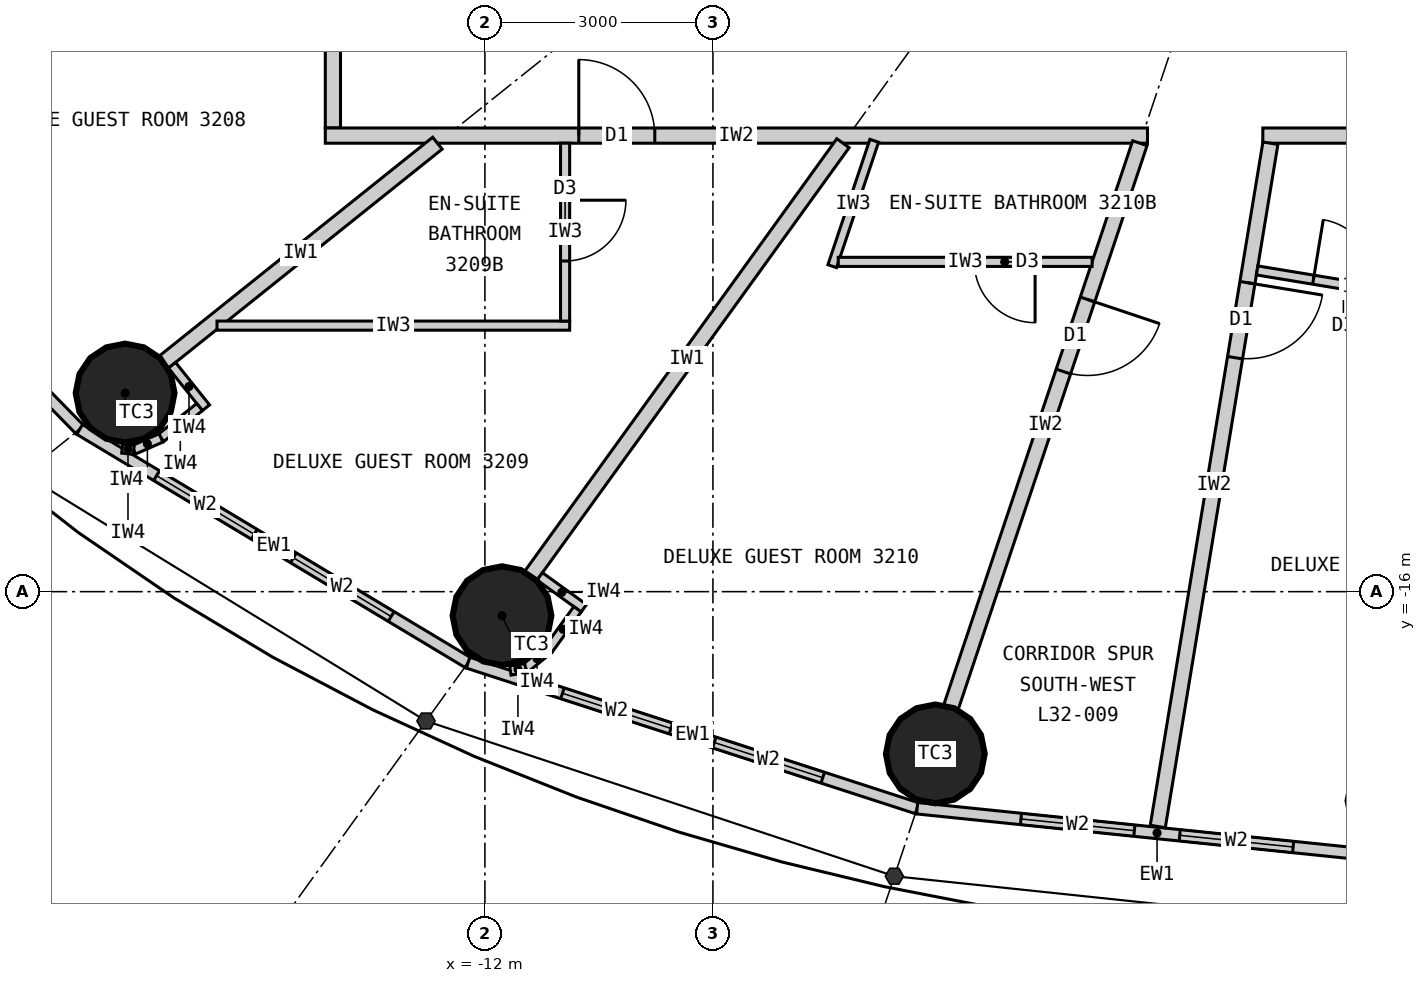
"""IFC4 building model, lengths in metres.
Left out: names, types, materials, properties, quantities, classifications, styles, units other than length and angle.
Written with IfcOpenShell. Run it as: python <this file> out.ifc"""

import sys

from ifc_helpers import new_model, si_unit, direction, frame, frame_2d, origin, origin_2d, place, context, subcontext, project, spatial, rectangle, circle, extrude, element, fill, save


model = new_model("IFC4")
c1 = context("Model", 3, precision=1e-05, world=origin(), true_north=direction((0.0, 1.0)))
c2 = subcontext(c1, "Body", "Model", "MODEL_VIEW")
j1 = project(units=[si_unit("LENGTHUNIT", "METRE"), si_unit("PLANEANGLEUNIT", "RADIAN")], contexts=[c1])
p1 = place(None, origin())
s1 = spatial("IfcSite", under=j1, at=p1, CompositionType="ELEMENT")
p2 = place(p1, origin())
s2 = spatial("IfcBuilding", under=s1, at=p2, CompositionType="ELEMENT")
p3 = place(p2, frame((0.0, 0.0, 125.4)))
s3 = spatial("IfcBuildingStorey", under=s2, at=p3, CompositionType="ELEMENT", Elevation=125.4)
for number, where, z_axis, x_axis in (
    (1, (-16.734, -13.387, 0.0), (0.0, 0.0, 1.0), (1.0, 0.0, 0.0)),
    (2, (-11.775, -16.316, 0.0), (0.0, 0.0, 1.0), (1.0, 0.0, 0.0)),
    (3, (-6.074, -18.135, 0.0), (0.0, 0.0, 1.0), (1.0, 0.0, 0.0)),
):
    element("IfcColumn", number, at=place(p3, frame(where, z_axis=z_axis, x_axis=x_axis)), inside=s3, PredefinedType="COLUMN", context=c2, shape_type="SweptSolid", body=[
        extrude(circle(Radius=0.65, at=origin_2d()), origin(), (0.0, 0.0, 1.0), 3.3),
    ])
p4 = place(p3, frame((-21.287, -9.832, 0.0), z_axis=(0.0, 0.0, 1.0), x_axis=(0.700136650834, -0.714008872605, 0.0)))
e4 = element("IfcWall", 4, at=p4, inside=s3, PredefinedType="ELEMENTEDWALL", context=c2, shape_type="SweptSolid", body=[
    extrude(rectangle(XDim=5.649, YDim=0.15, at=frame_2d((2.825, 0.0))), origin(), (0.0, 0.0, 1.0), 3.12),
])
p5 = place(p4, frame((1.025, 0.0, 0.9)))
e5 = element("IfcOpeningElement", 5, at=p5, cuts=e4, PredefinedType="OPENING", context=c2, shape_type="SweptSolid", body=[
    extrude(rectangle(XDim=1.5, YDim=1.9, at=frame_2d((0.75, 0.95))), frame((0.0, 0.085, 0.0), z_axis=(0.0, -1.0, 0.0), x_axis=(1.0, 0.0, 0.0)), (0.0, 0.0, 1.0), 0.17),
])
p6 = place(p4, frame((3.125, 0.0, 0.9)))
e6 = element("IfcOpeningElement", 6, at=p6, cuts=e4, PredefinedType="OPENING", context=c2, shape_type="SweptSolid", body=[
    extrude(rectangle(XDim=1.5, YDim=1.9, at=frame_2d((0.75, 0.95))), frame((0.0, 0.085, 0.0), z_axis=(0.0, -1.0, 0.0), x_axis=(1.0, 0.0, 0.0)), (0.0, 0.0, 1.0), 0.17),
])
p7 = place(p3, frame((-17.332, -13.866, 0.0), z_axis=(0.0, 0.0, 1.0), x_axis=(0.857308573723, -0.514802884044, 0.0)))
e7 = element("IfcWall", 7, at=p7, inside=s3, PredefinedType="ELEMENTEDWALL", context=c2, shape_type="SweptSolid", body=[
    extrude(rectangle(XDim=5.961, YDim=0.15, at=frame_2d((2.98, 0.0))), origin(), (0.0, 0.0, 1.0), 3.12),
])
p8 = place(p7, frame((1.181, 0.0, 0.9)))
e8 = element("IfcOpeningElement", 8, at=p8, cuts=e7, PredefinedType="OPENING", context=c2, shape_type="SweptSolid", body=[
    extrude(rectangle(XDim=1.5, YDim=1.9, at=frame_2d((0.75, 0.95))), frame((0.0, 0.085, 0.0), z_axis=(0.0, -1.0, 0.0), x_axis=(1.0, 0.0, 0.0)), (0.0, 0.0, 1.0), 0.17),
])
p9 = place(p7, frame((3.281, 0.0, 0.9)))
e9 = element("IfcOpeningElement", 9, at=p9, cuts=e7, PredefinedType="OPENING", context=c2, shape_type="SweptSolid", body=[
    extrude(rectangle(XDim=1.5, YDim=1.9, at=frame_2d((0.75, 0.95))), frame((0.0, 0.085, 0.0), z_axis=(0.0, -1.0, 0.0), x_axis=(1.0, 0.0, 0.0)), (0.0, 0.0, 1.0), 0.17),
])
p10 = place(p3, frame((-12.221, -16.935, 0.0), z_axis=(0.0, 0.0, 1.0), x_axis=(0.951272691506, -0.308350881944, 0.0)))
e10 = element("IfcWall", 10, at=p10, inside=s3, PredefinedType="ELEMENTEDWALL", context=c2, shape_type="SweptSolid", body=[
    extrude(rectangle(XDim=6.211, YDim=0.15, at=frame_2d((3.105, 0.0))), origin(), (0.0, 0.0, 1.0), 3.12),
])
p11 = place(p10, frame((1.305, 0.0, 0.9)))
e11 = element("IfcOpeningElement", 11, at=p11, cuts=e10, PredefinedType="OPENING", context=c2, shape_type="SweptSolid", body=[
    extrude(rectangle(XDim=1.5, YDim=1.9, at=frame_2d((0.75, 0.95))), frame((0.0, 0.085, 0.0), z_axis=(0.0, -1.0, 0.0), x_axis=(1.0, 0.0, 0.0)), (0.0, 0.0, 1.0), 0.17),
])
p12 = place(p10, frame((3.405, 0.0, 0.9)))
e12 = element("IfcOpeningElement", 12, at=p12, cuts=e10, PredefinedType="OPENING", context=c2, shape_type="SweptSolid", body=[
    extrude(rectangle(XDim=1.5, YDim=1.9, at=frame_2d((0.75, 0.95))), frame((0.0, 0.085, 0.0), z_axis=(0.0, -1.0, 0.0), x_axis=(1.0, 0.0, 0.0)), (0.0, 0.0, 1.0), 0.17),
])
p13 = place(p3, frame((-6.313, -18.85, 0.0), z_axis=(0.0, 0.0, 1.0), x_axis=(0.994735690163, -0.102473931887, 0.0)))
e13 = element("IfcWall", 13, at=p13, inside=s3, PredefinedType="ELEMENTEDWALL", context=c2, shape_type="SweptSolid", body=[
    extrude(rectangle(XDim=6.347, YDim=0.15, at=frame_2d((3.173, 0.0))), origin(), (0.0, 0.0, 1.0), 3.12),
])
p14 = place(p13, frame((1.373, 0.0, 0.9)))
e14 = element("IfcOpeningElement", 14, at=p14, cuts=e13, PredefinedType="OPENING", context=c2, shape_type="SweptSolid", body=[
    extrude(rectangle(XDim=1.5, YDim=1.9, at=frame_2d((0.75, 0.95))), frame((0.0, 0.085, 0.0), z_axis=(0.0, -1.0, 0.0), x_axis=(1.0, 0.0, 0.0)), (0.0, 0.0, 1.0), 0.17),
])
p15 = place(p13, frame((3.473, 0.0, 0.9)))
e15 = element("IfcOpeningElement", 15, at=p15, cuts=e13, PredefinedType="OPENING", context=c2, shape_type="SweptSolid", body=[
    extrude(rectangle(XDim=1.5, YDim=1.9, at=frame_2d((0.75, 0.95))), frame((0.0, 0.085, 0.0), z_axis=(0.0, -1.0, 0.0), x_axis=(1.0, 0.0, 0.0)), (0.0, 0.0, 1.0), 0.17),
])
p16 = place(p3, frame((-14.0, 9.9, 0.0), z_axis=(0.0, 0.0, 1.0), x_axis=(0.0, -1.0, 0.0)))
e16 = element("IfcWall", 16, at=p16, inside=s3, PredefinedType="PARTITIONING", context=c2, shape_type="SweptSolid", body=[
    extrude(rectangle(XDim=19.8, YDim=0.2, at=frame_2d((9.9, 0.0))), origin(), (0.0, 0.0, 1.0), 3.12),
])
p17 = place(p16, frame((1.678, 0.0, 0.0)))
e17 = element("IfcOpeningElement", 17, at=p17, cuts=e16, PredefinedType="OPENING", context=c2, shape_type="SweptSolid", body=[
    extrude(rectangle(XDim=1.0, YDim=2.2, at=frame_2d((0.5, 1.1))), frame((0.0, 0.11, 0.0), z_axis=(0.0, -1.0, 0.0), x_axis=(1.0, 0.0, 0.0)), (0.0, 0.0, 1.0), 0.22),
])
p18 = place(p16, frame((7.598, 0.0, 0.0)))
e18 = element("IfcOpeningElement", 18, at=p18, cuts=e16, PredefinedType="OPENING", context=c2, shape_type="SweptSolid", body=[
    extrude(rectangle(XDim=1.0, YDim=2.2, at=frame_2d((0.5, 1.1))), frame((0.0, 0.11, 0.0), z_axis=(0.0, -1.0, 0.0), x_axis=(1.0, 0.0, 0.0)), (0.0, 0.0, 1.0), 0.22),
])
p19 = place(p16, frame((12.26, 0.0, 0.0)))
e19 = element("IfcOpeningElement", 19, at=p19, cuts=e16, PredefinedType="OPENING", context=c2, shape_type="SweptSolid", body=[
    extrude(rectangle(XDim=1.0, YDim=2.2, at=frame_2d((0.5, 1.1))), frame((0.0, 0.11, 0.0), z_axis=(0.0, -1.0, 0.0), x_axis=(1.0, 0.0, 0.0)), (0.0, 0.0, 1.0), 0.22),
])
p20 = place(p16, frame((16.922, 0.0, 0.0)))
e20 = element("IfcOpeningElement", 20, at=p20, cuts=e16, PredefinedType="OPENING", context=c2, shape_type="SweptSolid", body=[
    extrude(rectangle(XDim=1.0, YDim=2.2, at=frame_2d((0.5, 1.1))), frame((0.0, 0.11, 0.0), z_axis=(0.0, -1.0, 0.0), x_axis=(1.0, 0.0, 0.0)), (0.0, 0.0, 1.0), 0.22),
])
p21 = place(p3, frame((1.765, -10.0, 0.0), z_axis=(0.0, 0.0, 1.0), x_axis=(-1.0, 0.0, 0.0)))
e21 = element("IfcWall", 21, at=p21, inside=s3, PredefinedType="PARTITIONING", context=c2, shape_type="SweptSolid", body=[
    extrude(rectangle(XDim=3.53, YDim=0.2, at=frame_2d((1.765, 0.0))), origin(), (0.0, 0.0, 1.0), 3.12),
])
p22 = place(p3, frame((-3.283, -10.0, 0.0), z_axis=(0.0, 0.0, 1.0), x_axis=(-1.0, 0.0, 0.0)))
e22 = element("IfcWall", 22, at=p22, inside=s3, PredefinedType="PARTITIONING", context=c2, shape_type="SweptSolid", body=[
    extrude(rectangle(XDim=10.817, YDim=0.2, at=frame_2d((5.409, 0.0))), origin(), (0.0, 0.0, 1.0), 3.12),
])
p23 = place(p22, frame((6.482, 0.0, 0.0)))
e23 = element("IfcOpeningElement", 23, at=p23, cuts=e22, PredefinedType="OPENING", context=c2, shape_type="SweptSolid", body=[
    extrude(rectangle(XDim=1.0, YDim=2.2, at=frame_2d((0.5, 1.1))), frame((0.0, 0.11, 0.0), z_axis=(0.0, -1.0, 0.0), x_axis=(1.0, 0.0, 0.0)), (0.0, 0.0, 1.0), 0.22),
])
p24 = place(p3, frame((-12.625, -10.1, 0.0), z_axis=(0.0, 0.0, 1.0), x_axis=(-0.780863644897, -0.624701503182, 0.0)))
e24 = element("IfcWall", 24, at=p24, inside=s3, PredefinedType="PARTITIONING", context=c2, shape_type="SweptSolid", body=[
    extrude(rectangle(XDim=4.612, YDim=0.2, at=frame_2d((2.306, 0.0))), origin(), (0.0, 0.0, 1.0), 2.37),
])
p25 = place(p3, frame((-7.289, -10.1, 0.0), z_axis=(0.0, 0.0, 1.0), x_axis=(-0.585217367024, -0.81087645997, 0.0)))
e25 = element("IfcWall", 25, at=p25, inside=s3, PredefinedType="PARTITIONING", context=c2, shape_type="SweptSolid", body=[
    extrude(rectangle(XDim=7.016, YDim=0.2, at=frame_2d((3.508, 0.0))), origin(), (0.0, 0.0, 1.0), 2.37),
])
p26 = place(p3, frame((-3.383, -10.1, 0.0), z_axis=(0.0, 0.0, 1.0), x_axis=(-0.317603705574, -0.948223542318, 0.0)))
e26 = element("IfcWall", 26, at=p26, inside=s3, PredefinedType="PARTITIONING", context=c2, shape_type="SweptSolid", body=[
    extrude(rectangle(XDim=7.823, YDim=0.2, at=frame_2d((3.912, 0.0))), origin(), (0.0, 0.0, 1.0), 2.37),
])
p27 = place(p26, frame((2.168, 0.0, 0.0)))
e27 = element("IfcOpeningElement", 27, at=p27, cuts=e26, PredefinedType="OPENING", context=c2, shape_type="SweptSolid", body=[
    extrude(rectangle(XDim=1.0, YDim=2.2, at=frame_2d((0.5, 1.1))), frame((0.0, 0.11, 0.0), z_axis=(0.0, -1.0, 0.0), x_axis=(1.0, 0.0, 0.0)), (0.0, 0.0, 1.0), 0.22),
])
p28 = place(p3, frame((-1.665, -10.1, 0.0), z_axis=(0.0, 0.0, 1.0), x_axis=(-0.162660519103, -0.986682094459, 0.0)))
e28 = element("IfcWall", 28, at=p28, inside=s3, PredefinedType="PARTITIONING", context=c2, shape_type="SweptSolid", body=[
    extrude(rectangle(XDim=9.111, YDim=0.2, at=frame_2d((4.555, 0.0))), origin(), (0.0, 0.0, 1.0), 3.12),
])
p29 = place(p28, frame((1.86, 0.0, 0.0)))
e29 = element("IfcOpeningElement", 29, at=p29, cuts=e28, PredefinedType="OPENING", context=c2, shape_type="SweptSolid", body=[
    extrude(rectangle(XDim=1.0, YDim=2.2, at=frame_2d((0.5, 1.1))), frame((0.0, 0.11, 0.0), z_axis=(0.0, -1.0, 0.0), x_axis=(1.0, 0.0, 0.0)), (0.0, 0.0, 1.0), 0.22),
])
p30 = place(p3, frame((-15.525, -12.5, 0.0), z_axis=(0.0, 0.0, 1.0), x_axis=(1.0, 0.0, 0.0)))
e30 = element("IfcWall", 30, at=p30, inside=s3, PredefinedType="PARTITIONING", context=c2, shape_type="SweptSolid", body=[
    extrude(rectangle(XDim=4.64, YDim=0.12, at=frame_2d((2.32, 0.0))), origin(), (0.0, 0.0, 1.0), 3.12),
])
p31 = place(p3, frame((-10.945, -10.1, 0.0), z_axis=(0.0, 0.0, 1.0), x_axis=(0.0, -1.0, 0.0)))
e31 = element("IfcWall", 31, at=p31, inside=s3, PredefinedType="PARTITIONING", context=c2, shape_type="SweptSolid", body=[
    extrude(rectangle(XDim=2.34, YDim=0.12, at=frame_2d((1.17, 0.0))), origin(), (0.0, 0.0, 1.0), 3.12),
])
p32 = place(p31, frame((0.75, 0.0, 0.0)))
e32 = element("IfcOpeningElement", 32, at=p32, cuts=e31, PredefinedType="OPENING", context=c2, shape_type="SweptSolid", body=[
    extrude(rectangle(XDim=0.8, YDim=2.1, at=frame_2d((0.4, 1.05))), frame((0.0, 0.07, 0.0), z_axis=(0.0, -1.0, 0.0), x_axis=(1.0, 0.0, 0.0)), (0.0, 0.0, 1.0), 0.14),
])
p33 = place(p3, frame((-6.878, -10.068, 0.0), z_axis=(0.0, 0.0, 1.0), x_axis=(-0.317532394508, -0.948247424694, 0.0)))
e33 = element("IfcWall", 33, at=p33, inside=s3, PredefinedType="PARTITIONING", context=c2, shape_type="SweptSolid", body=[
    extrude(rectangle(XDim=1.74, YDim=0.12, at=frame_2d((0.87, 0.0))), origin(), (0.0, 0.0, 1.0), 3.12),
])
p34 = place(p3, frame((-4.011, -11.661, 0.0), z_axis=(0.0, 0.0, 1.0), x_axis=(-1.0, 0.0, 0.0)))
e34 = element("IfcWall", 34, at=p34, inside=s3, PredefinedType="PARTITIONING", context=c2, shape_type="SweptSolid", body=[
    extrude(rectangle(XDim=3.34, YDim=0.12, at=frame_2d((1.67, 0.0))), origin(), (0.0, 0.0, 1.0), 3.12),
])
p35 = place(p34, frame((0.75, 0.0, 0.0)))
e35 = element("IfcOpeningElement", 35, at=p35, cuts=e34, PredefinedType="OPENING", context=c2, shape_type="SweptSolid", body=[
    extrude(rectangle(XDim=0.8, YDim=2.1, at=frame_2d((0.4, 1.05))), frame((0.0, 0.07, 0.0), z_axis=(0.0, -1.0, 0.0), x_axis=(1.0, 0.0, 0.0)), (0.0, 0.0, 1.0), 0.14),
])
p36 = place(p3, frame((-1.84, -11.774, 0.0), z_axis=(0.0, 0.0, 1.0), x_axis=(0.986676602341, -0.162693830222, 0.0)))
e36 = element("IfcWall", 36, at=p36, inside=s3, PredefinedType="PARTITIONING", context=c2, shape_type="SweptSolid", body=[
    extrude(rectangle(XDim=2.74, YDim=0.12, at=frame_2d((1.37, 0.0))), origin(), (0.0, 0.0, 1.0), 3.12),
])
p37 = place(p36, frame((0.75, 0.0, 0.0)))
e37 = element("IfcOpeningElement", 37, at=p37, cuts=e36, PredefinedType="OPENING", context=c2, shape_type="SweptSolid", body=[
    extrude(rectangle(XDim=0.8, YDim=2.1, at=frame_2d((0.4, 1.05))), frame((0.0, 0.07, 0.0), z_axis=(0.0, -1.0, 0.0), x_axis=(1.0, 0.0, 0.0)), (0.0, 0.0, 1.0), 0.14),
])
p38 = place(p3, frame((-16.117, -13.022, 0.0), z_axis=(0.0, 0.0, 1.0), x_axis=(0.62465344249, -0.780902091677, 0.0)))
e38 = element("IfcWall", 38, at=p38, inside=s3, PredefinedType="PARTITIONING", context=c2, shape_type="SweptSolid", body=[
    extrude(rectangle(XDim=0.716, YDim=0.12, at=frame_2d((0.358, 0.0))), origin(), (0.0, 0.0, 1.0), 3.12),
])
p39 = place(p3, frame((-15.754, -13.571, 0.0), z_axis=(0.0, 0.0, 1.0), x_axis=(-0.780905453553, -0.624649239663, 0.0)))
e39 = element("IfcWall", 39, at=p39, inside=s3, PredefinedType="PARTITIONING", context=c2, shape_type="SweptSolid", body=[
    extrude(rectangle(XDim=0.65, YDim=0.12, at=frame_2d((0.325, 0.0))), origin(), (0.0, 0.0, 1.0), 3.12),
])
p40 = place(p3, frame((-16.262, -13.977, 0.0), z_axis=(0.0, 0.0, 1.0), x_axis=(-0.915985403703, -0.401211590314, 0.0)))
e40 = element("IfcWall", 40, at=p40, inside=s3, PredefinedType="PARTITIONING", context=c2, shape_type="SweptSolid", body=[
    extrude(rectangle(XDim=0.391, YDim=0.12, at=frame_2d((0.196, 0.0))), origin(), (0.0, 0.0, 1.0), 3.12),
])
p41 = place(p3, frame((-16.62, -14.134, 0.0), z_axis=(0.0, 0.0, 1.0), x_axis=(-0.993941871493, 0.109907033867, 0.0)))
e41 = element("IfcWall", 41, at=p41, inside=s3, PredefinedType="PARTITIONING", context=c2, shape_type="SweptSolid", body=[
    extrude(rectangle(XDim=0.153, YDim=0.12, at=frame_2d((0.077, 0.0))), origin(), (0.0, 0.0, 1.0), 3.12),
])
p42 = place(p3, frame((-11.279, -15.799, 0.0), z_axis=(0.0, 0.0, 1.0), x_axis=(0.810912957127, -0.585166793285, 0.0)))
e42 = element("IfcWall", 42, at=p42, inside=s3, PredefinedType="PARTITIONING", context=c2, shape_type="SweptSolid", body=[
    extrude(rectangle(XDim=0.716, YDim=0.12, at=frame_2d((0.358, 0.0))), origin(), (0.0, 0.0, 1.0), 3.12),
])
p43 = place(p3, frame((-10.782, -16.231, 0.0), z_axis=(0.0, 0.0, 1.0), x_axis=(-0.585175102182, -0.810906961239, 0.0)))
e43 = element("IfcWall", 43, at=p43, inside=s3, PredefinedType="PARTITIONING", context=c2, shape_type="SweptSolid", body=[
    extrude(rectangle(XDim=0.65, YDim=0.12, at=frame_2d((0.325, 0.0))), origin(), (0.0, 0.0, 1.0), 3.12),
])
p44 = place(p3, frame((-11.162, -16.759, 0.0), z_axis=(0.0, 0.0, 1.0), x_axis=(-0.775178428527, -0.63174235567, 0.0)))
e44 = element("IfcWall", 44, at=p44, inside=s3, PredefinedType="PARTITIONING", context=c2, shape_type="SweptSolid", body=[
    extrude(rectangle(XDim=0.392, YDim=0.12, at=frame_2d((0.196, 0.0))), origin(), (0.0, 0.0, 1.0), 3.12),
])
p45 = place(p3, frame((-11.466, -17.006, 0.0), z_axis=(0.0, 0.0, 1.0), x_axis=(-0.987228877621, -0.15930832744, 0.0)))
e45 = element("IfcWall", 45, at=p45, inside=s3, PredefinedType="PARTITIONING", context=c2, shape_type="SweptSolid", body=[
    extrude(rectangle(XDim=0.202, YDim=0.12, at=frame_2d((0.101, 0.0))), origin(), (0.0, 0.0, 1.0), 3.12),
])
p46 = place(p8, origin())
e46 = element("IfcWindow", 46, at=p46, inside=s3, PartitioningType="SINGLE_PANEL", PredefinedType="WINDOW", context=c2, shape_type="SweptSolid", body=[
    extrude(rectangle(XDim=1.5, YDim=1.9, at=frame_2d((0.75, 0.95))), frame((0.0, 0.03, 0.0), z_axis=(0.0, -1.0, 0.0), x_axis=(1.0, 0.0, 0.0)), (0.0, 0.0, 1.0), 0.06),
])
fill(e8, e46)
p47 = place(p9, origin())
e47 = element("IfcWindow", 47, at=p47, inside=s3, PartitioningType="SINGLE_PANEL", PredefinedType="WINDOW", context=c2, shape_type="SweptSolid", body=[
    extrude(rectangle(XDim=1.5, YDim=1.9, at=frame_2d((0.75, 0.95))), frame((0.0, 0.03, 0.0), z_axis=(0.0, -1.0, 0.0), x_axis=(1.0, 0.0, 0.0)), (0.0, 0.0, 1.0), 0.06),
])
fill(e9, e47)
p48 = place(p11, origin())
e48 = element("IfcWindow", 48, at=p48, inside=s3, PartitioningType="SINGLE_PANEL", PredefinedType="WINDOW", context=c2, shape_type="SweptSolid", body=[
    extrude(rectangle(XDim=1.5, YDim=1.9, at=frame_2d((0.75, 0.95))), frame((0.0, 0.03, 0.0), z_axis=(0.0, -1.0, 0.0), x_axis=(1.0, 0.0, 0.0)), (0.0, 0.0, 1.0), 0.06),
])
fill(e11, e48)
p49 = place(p12, origin())
e49 = element("IfcWindow", 49, at=p49, inside=s3, PartitioningType="SINGLE_PANEL", PredefinedType="WINDOW", context=c2, shape_type="SweptSolid", body=[
    extrude(rectangle(XDim=1.5, YDim=1.9, at=frame_2d((0.75, 0.95))), frame((0.0, 0.03, 0.0), z_axis=(0.0, -1.0, 0.0), x_axis=(1.0, 0.0, 0.0)), (0.0, 0.0, 1.0), 0.06),
])
fill(e12, e49)
p50 = place(p14, origin())
e50 = element("IfcWindow", 50, at=p50, inside=s3, PartitioningType="SINGLE_PANEL", PredefinedType="WINDOW", context=c2, shape_type="SweptSolid", body=[
    extrude(rectangle(XDim=1.5, YDim=1.9, at=frame_2d((0.75, 0.95))), frame((0.0, 0.03, 0.0), z_axis=(0.0, -1.0, 0.0), x_axis=(1.0, 0.0, 0.0)), (0.0, 0.0, 1.0), 0.06),
])
fill(e14, e50)
p51 = place(p15, origin())
e51 = element("IfcWindow", 51, at=p51, inside=s3, PartitioningType="SINGLE_PANEL", PredefinedType="WINDOW", context=c2, shape_type="SweptSolid", body=[
    extrude(rectangle(XDim=1.5, YDim=1.9, at=frame_2d((0.75, 0.95))), frame((0.0, 0.03, 0.0), z_axis=(0.0, -1.0, 0.0), x_axis=(1.0, 0.0, 0.0)), (0.0, 0.0, 1.0), 0.06),
])
fill(e15, e51)
p52 = place(p32, origin())
e52 = element("IfcDoor", 52, at=p52, inside=s3, OperationType="SINGLE_SWING_LEFT", PredefinedType="DOOR", context=c2, shape_type="SweptSolid", body=[
    extrude(rectangle(XDim=0.8, YDim=2.1, at=frame_2d((0.4, 1.05))), frame((0.0, 0.025, 0.0), z_axis=(0.0, -1.0, 0.0), x_axis=(1.0, 0.0, 0.0)), (0.0, 0.0, 1.0), 0.05),
])
fill(e32, e52)
p53 = place(p23, origin())
e53 = element("IfcDoor", 53, at=p53, inside=s3, OperationType="SINGLE_SWING_RIGHT", PredefinedType="DOOR", context=c2, shape_type="SweptSolid", body=[
    extrude(rectangle(XDim=1.0, YDim=2.2, at=frame_2d((0.5, 1.1))), frame((0.0, 0.025, 0.0), z_axis=(0.0, -1.0, 0.0), x_axis=(1.0, 0.0, 0.0)), (0.0, 0.0, 1.0), 0.05),
])
fill(e23, e53)
p54 = place(p35, origin())
e54 = element("IfcDoor", 54, at=p54, inside=s3, OperationType="SINGLE_SWING_LEFT", PredefinedType="DOOR", context=c2, shape_type="SweptSolid", body=[
    extrude(rectangle(XDim=0.8, YDim=2.1, at=frame_2d((0.4, 1.05))), frame((0.0, 0.025, 0.0), z_axis=(0.0, -1.0, 0.0), x_axis=(1.0, 0.0, 0.0)), (0.0, 0.0, 1.0), 0.05),
])
fill(e35, e54)
p55 = place(p27, origin())
e55 = element("IfcDoor", 55, at=p55, inside=s3, OperationType="SINGLE_SWING_LEFT", PredefinedType="DOOR", context=c2, shape_type="SweptSolid", body=[
    extrude(rectangle(XDim=1.0, YDim=2.2, at=frame_2d((0.5, 1.1))), frame((0.0, 0.025, 0.0), z_axis=(0.0, -1.0, 0.0), x_axis=(1.0, 0.0, 0.0)), (0.0, 0.0, 1.0), 0.05),
])
fill(e27, e55)
p56 = place(p37, origin())
e56 = element("IfcDoor", 56, at=p56, inside=s3, OperationType="SINGLE_SWING_LEFT", PredefinedType="DOOR", context=c2, shape_type="SweptSolid", body=[
    extrude(rectangle(XDim=0.8, YDim=2.1, at=frame_2d((0.4, 1.05))), frame((0.0, 0.025, 0.0), z_axis=(0.0, -1.0, 0.0), x_axis=(1.0, 0.0, 0.0)), (0.0, 0.0, 1.0), 0.05),
])
fill(e37, e56)
p57 = place(p29, origin())
e57 = element("IfcDoor", 57, at=p57, inside=s3, OperationType="SINGLE_SWING_LEFT", PredefinedType="DOOR", context=c2, shape_type="SweptSolid", body=[
    extrude(rectangle(XDim=1.0, YDim=2.2, at=frame_2d((0.5, 1.1))), frame((0.0, 0.025, 0.0), z_axis=(0.0, -1.0, 0.0), x_axis=(1.0, 0.0, 0.0)), (0.0, 0.0, 1.0), 0.05),
])
fill(e29, e57)
save(model, sys.argv[1])
